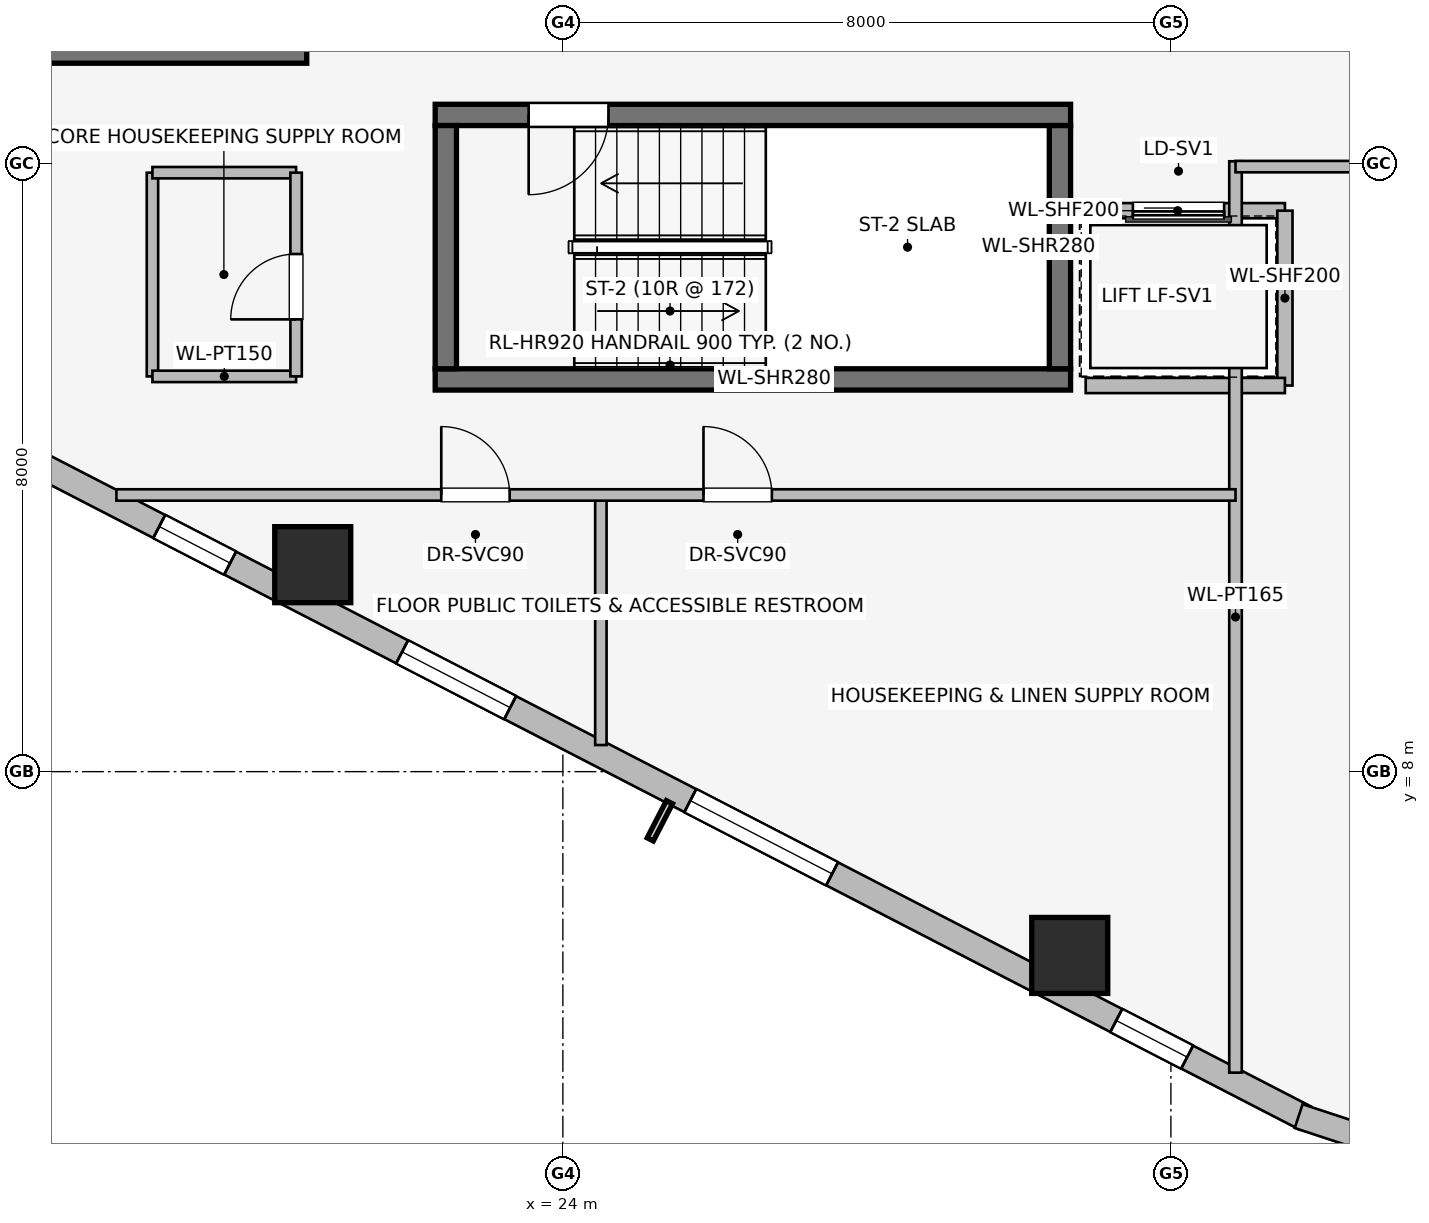
"""IFC4 building model, lengths in metres.
Left out: names, types, materials, properties, quantities, classifications, styles, units other than length and angle.
Written with IfcOpenShell. Run it as: python <this file> out.ifc"""

import sys

from ifc_helpers import new_model, si_unit, direction, frame, frame_2d, origin, origin_2d, place, context, subcontext, project, spatial, rectangle, extrude, element, fill, save


model = new_model("IFC4")
c1 = context("Model", 3, precision=1e-05, world=origin(), true_north=direction((0.0, 1.0)))
c2 = subcontext(c1, "Body", "Model", "MODEL_VIEW")
j1 = project(units=[si_unit("LENGTHUNIT", "METRE"), si_unit("PLANEANGLEUNIT", "RADIAN")], contexts=[c1])
p1 = place(None, origin())
s1 = spatial("IfcSite", under=j1, at=p1, CompositionType="ELEMENT")
p2 = place(p1, origin())
s2 = spatial("IfcBuilding", under=s1, at=p2, CompositionType="ELEMENT")
p3 = place(p2, frame((0.0, 0.0, 156.75)))
s3 = spatial("IfcBuildingStorey", under=s2, at=p3, CompositionType="ELEMENT", Elevation=156.75)
p4 = place(p3, frame((16.87, 17.46, 0.0), z_axis=(0.0, 0.0, 1.0), x_axis=(1.0, 0.0, 0.0)))
e1 = element("IfcWall", 1, at=p4, inside=s3, PredefinedType="SHEAR", context=c2, shape_type="SweptSolid", body=[
    extrude(rectangle(XDim=3.76, YDim=0.28, at=frame_2d((1.88, 0.0))), origin(), (0.0, 0.0, 1.0), 3.45),
])
p5 = place(p3, frame((22.32, 13.16, 0.0), z_axis=(0.0, 0.0, 1.0), x_axis=(1.0, 0.0, 0.0)))
e2 = element("IfcWall", 2, at=p5, inside=s3, PredefinedType="SHEAR", context=c2, shape_type="SweptSolid", body=[
    extrude(rectangle(XDim=8.36, YDim=0.28, at=frame_2d((4.18, 0.0))), origin(), (0.0, 0.0, 1.0), 3.45),
])
p6 = place(p3, frame((30.68, 16.64, 0.0), z_axis=(0.0, 0.0, 1.0), x_axis=(-1.0, 0.0, 0.0)))
e3 = element("IfcWall", 3, at=p6, inside=s3, PredefinedType="SHEAR", context=c2, shape_type="SweptSolid", body=[
    extrude(rectangle(XDim=8.36, YDim=0.28, at=frame_2d((4.18, 0.0))), origin(), (0.0, 0.0, 1.0), 3.45),
])
p7 = place(p6, frame((6.08, 0.0, 0.0)))
e4 = element("IfcOpeningElement", 4, at=p7, cuts=e3, PredefinedType="OPENING", context=c2, shape_type="SweptSolid", body=[
    extrude(rectangle(XDim=1.05, YDim=2.0, at=frame_2d((0.525, 1.0))), frame((0.0, 0.15, 0.0), z_axis=(0.0, -1.0, 0.0), x_axis=(1.0, 0.0, 0.0)), (0.0, 0.0, 1.0), 0.3),
])
for number, where, z_axis, x_axis in (
    (5, (22.46, 16.5, 0.0), (0.0, 0.0, 1.0), (0.0, -1.0, 0.0)),
    (6, (30.54, 13.3, 0.0), (0.0, 0.0, 1.0), (0.0, 1.0, 0.0)),
):
    element("IfcWall", number, at=place(p3, frame(where, z_axis=z_axis, x_axis=x_axis)), inside=s3, PredefinedType="SHEAR", context=c2, shape_type="SweptSolid", body=[
        extrude(rectangle(XDim=3.2, YDim=0.28, at=frame_2d((1.6, 0.0))), origin(), (0.0, 0.0, 1.0), 3.45),
    ])
for number, where, z_axis, x_axis in (
    (7, (20.709, 10.723, 0.0), (0.0, 0.0, 1.0), (1.0, 0.0, 0.0)),
    (8, (30.669, 5.582, 0.0), (0.0, 0.0, 1.0), (1.0, 0.0, 0.0)),
):
    element("IfcColumn", number, at=place(p3, frame(where, z_axis=z_axis, x_axis=x_axis)), inside=s3, PredefinedType="COLUMN", context=c2, shape_type="SweptSolid", body=[
        extrude(rectangle(XDim=1.0, YDim=1.0, at=origin_2d()), origin(), (0.0, 0.0, 1.0), 3.45),
    ])
p8 = place(p3, frame((17.243, 11.95, 0.0), z_axis=(0.0, 0.0, 1.0), x_axis=(-0.790621329885, 0.612305408053, 0.0)))
e9 = element("IfcWall", 9, at=p8, inside=s3, PredefinedType="STANDARD", context=c2, shape_type="SweptSolid", body=[
    extrude(rectangle(XDim=1.676, YDim=0.33, at=frame_2d((0.838, 0.0))), origin(), (0.0, 0.0, 1.0), 3.19),
])
p9 = place(p3, frame((33.769, 3.442, 0.0), z_axis=(0.0, 0.0, 1.0), x_axis=(-0.888613612362, 0.458656568606, 0.0)))
e10 = element("IfcWall", 10, at=p9, inside=s3, PredefinedType="STANDARD", context=c2, shape_type="SweptSolid", body=[
    extrude(rectangle(XDim=18.681, YDim=0.34, at=frame_2d((9.34, 0.0))), origin(), (0.0, 0.0, 1.0), 2.562),
])
p10 = place(p9, frame((1.75, 0.0, 0.75)))
e11 = element("IfcOpeningElement", 11, at=p10, cuts=e10, PredefinedType="OPENING", context=c2, shape_type="SweptSolid", body=[
    extrude(rectangle(XDim=1.05, YDim=1.4, at=frame_2d((0.525, 0.7))), frame((0.0, 0.18, 0.0), z_axis=(0.0, -1.0, 0.0), x_axis=(1.0, 0.0, 0.0)), (0.0, 0.0, 1.0), 0.36),
])
p11 = place(p9, frame((7.007, 0.0, 0.75)))
e12 = element("IfcOpeningElement", 12, at=p11, cuts=e10, PredefinedType="OPENING", context=c2, shape_type="SweptSolid", body=[
    extrude(rectangle(XDim=2.1, YDim=1.5, at=frame_2d((1.05, 0.75))), frame((0.0, 0.18, 0.0), z_axis=(0.0, -1.0, 0.0), x_axis=(1.0, 0.0, 0.0)), (0.0, 0.0, 1.0), 0.36),
])
p12 = place(p9, frame((11.774, 0.0, 0.75)))
e13 = element("IfcOpeningElement", 13, at=p12, cuts=e10, PredefinedType="OPENING", context=c2, shape_type="SweptSolid", body=[
    extrude(rectangle(XDim=1.6, YDim=1.55, at=frame_2d((0.8, 0.775))), frame((0.0, 0.18, 0.0), z_axis=(0.0, -1.0, 0.0), x_axis=(1.0, 0.0, 0.0)), (0.0, 0.0, 1.0), 0.36),
])
p13 = place(p9, frame((15.92, 0.0, 0.75)))
e14 = element("IfcOpeningElement", 14, at=p13, cuts=e10, PredefinedType="OPENING", context=c2, shape_type="SweptSolid", body=[
    extrude(rectangle(XDim=1.05, YDim=1.4, at=frame_2d((0.525, 0.7))), frame((0.0, 0.18, 0.0), z_axis=(0.0, -1.0, 0.0), x_axis=(1.0, 0.0, 0.0)), (0.0, 0.0, 1.0), 0.36),
])
p14 = place(p3, frame((35.317, 2.93, 0.0), z_axis=(0.0, 0.0, 1.0), x_axis=(-0.949937416267, 0.312440242569, 0.0)))
e15 = element("IfcWall", 15, at=p14, inside=s3, PredefinedType="STANDARD", context=c2, shape_type="SweptSolid", body=[
    extrude(rectangle(XDim=1.722, YDim=0.33, at=frame_2d((0.861, 0.0))), origin(), (0.0, 0.0, 1.0), 3.19),
])
p15 = place(p3, frame((33.5, 15.38, 0.0), z_axis=(0.0, 0.0, 1.0), x_axis=(-1.0, 0.0, 0.0)))
e16 = element("IfcWall", 16, at=p15, inside=s3, PredefinedType="PARTITIONING", context=c2, shape_type="SweptSolid", body=[
    extrude(rectangle(XDim=2.82, YDim=0.2, at=frame_2d((1.41, 0.0))), origin(), (0.0, 0.0, 1.0), 3.19),
])
p16 = place(p15, frame((0.8, 0.0, 0.0)))
e17 = element("IfcOpeningElement", 17, at=p16, cuts=e16, PredefinedType="OPENING", context=c2, shape_type="SweptSolid", body=[
    extrude(rectangle(XDim=1.2, YDim=2.2, at=frame_2d((0.6, 1.1))), frame((0.0, 0.11, 0.0), z_axis=(0.0, -1.0, 0.0), x_axis=(1.0, 0.0, 0.0)), (0.0, 0.0, 1.0), 0.22),
])
p17 = place(p3, frame((33.5, 13.08, 0.0), z_axis=(0.0, 0.0, 1.0), x_axis=(0.0, 1.0, 0.0)))
e18 = element("IfcWall", 18, at=p17, inside=s3, PredefinedType="PARTITIONING", context=c2, shape_type="SweptSolid", body=[
    extrude(rectangle(XDim=2.3, YDim=0.2, at=frame_2d((1.15, 0.0))), origin(), (0.0, 0.0, 1.0), 3.19),
])
p18 = place(p3, frame((30.879, 13.08, 0.0), z_axis=(0.0, 0.0, 1.0), x_axis=(1.0, 0.0, 0.0)))
e19 = element("IfcWall", 19, at=p18, inside=s3, PredefinedType="PARTITIONING", context=c2, shape_type="SweptSolid", body=[
    extrude(rectangle(XDim=2.621, YDim=0.2, at=frame_2d((1.311, 0.0))), origin(), (0.0, 0.0, 1.0), 3.19),
])
p19 = place(p3, frame((18.6, 15.88, 0.0), z_axis=(0.0, 0.0, 1.0), x_axis=(0.0, -1.0, 0.0)))
e20 = element("IfcWall", 20, at=p19, inside=s3, PredefinedType="PARTITIONING", context=c2, shape_type="SweptSolid", body=[
    extrude(rectangle(XDim=2.68, YDim=0.15, at=frame_2d((1.34, 0.0))), origin(), (0.0, 0.0, 1.0), 3.19),
])
for number, where, z_axis, x_axis in (
    (21, (18.6, 13.2, 0.0), (0.0, 0.0, 1.0), (1.0, 0.0, 0.0)),
    (22, (18.6, 15.88, 0.0), (0.0, 0.0, 1.0), (1.0, 0.0, 0.0)),
):
    element("IfcWall", number, at=place(p3, frame(where, z_axis=z_axis, x_axis=x_axis)), inside=s3, PredefinedType="PARTITIONING", context=c2, shape_type="SweptSolid", body=[
        extrude(rectangle(XDim=1.89, YDim=0.15, at=frame_2d((0.945, 0.0))), origin(), (0.0, 0.0, 1.0), 3.19),
    ])
p20 = place(p3, frame((20.49, 13.2, 0.0), z_axis=(0.0, 0.0, 1.0), x_axis=(0.0, 1.0, 0.0)))
e23 = element("IfcWall", 23, at=p20, inside=s3, PredefinedType="PARTITIONING", context=c2, shape_type="SweptSolid", body=[
    extrude(rectangle(XDim=2.68, YDim=0.15, at=frame_2d((1.34, 0.0))), origin(), (0.0, 0.0, 1.0), 3.19),
])
p21 = place(p20, frame((0.75, 0.0, 0.0)))
e24 = element("IfcOpeningElement", 24, at=p21, cuts=e23, PredefinedType="OPENING", context=c2, shape_type="SweptSolid", body=[
    extrude(rectangle(XDim=0.86, YDim=2.0, at=frame_2d((0.43, 1.0))), frame((0.0, 0.085, 0.0), z_axis=(0.0, -1.0, 0.0), x_axis=(1.0, 0.0, 0.0)), (0.0, 0.0, 1.0), 0.17),
])
p22 = place(p3, frame((32.85, 4.04, 0.0), z_axis=(0.0, 0.0, 1.0), x_axis=(0.0, 1.0, 0.0)))
e25 = element("IfcWall", 25, at=p22, inside=s3, PredefinedType="PARTITIONING", context=c2, shape_type="SweptSolid", body=[
    extrude(rectangle(XDim=11.99, YDim=0.165, at=frame_2d((5.995, 0.0))), origin(), (0.0, 0.0, 1.0), 3.19),
])
p23 = place(p3, frame((24.5, 8.35, 0.0), z_axis=(0.0, 0.0, 1.0), x_axis=(0.0, 1.0, 0.0)))
e26 = element("IfcWall", 26, at=p23, inside=s3, PredefinedType="PARTITIONING", context=c2, shape_type="SweptSolid", body=[
    extrude(rectangle(XDim=3.29, YDim=0.15, at=frame_2d((1.645, 0.0))), origin(), (0.0, 0.0, 1.0), 3.19),
])
p24 = place(p3, frame((18.126, 11.64, 0.0), z_axis=(0.0, 0.0, 1.0), x_axis=(1.0, 0.0, 0.0)))
e27 = element("IfcWall", 27, at=p24, inside=s3, PredefinedType="PARTITIONING", context=c2, shape_type="SweptSolid", body=[
    extrude(rectangle(XDim=14.724, YDim=0.15, at=frame_2d((7.362, 0.0))), origin(), (0.0, 0.0, 1.0), 3.19),
])
p25 = place(p24, frame((4.274, 0.0, 0.0)))
e28 = element("IfcOpeningElement", 28, at=p25, cuts=e27, PredefinedType="OPENING", context=c2, shape_type="SweptSolid", body=[
    extrude(rectangle(XDim=0.9, YDim=2.0, at=frame_2d((0.45, 1.0))), frame((0.0, 0.085, 0.0), z_axis=(0.0, -1.0, 0.0), x_axis=(1.0, 0.0, 0.0)), (0.0, 0.0, 1.0), 0.17),
])
p26 = place(p24, frame((7.724, 0.0, 0.0)))
e29 = element("IfcOpeningElement", 29, at=p26, cuts=e27, PredefinedType="OPENING", context=c2, shape_type="SweptSolid", body=[
    extrude(rectangle(XDim=0.9, YDim=2.0, at=frame_2d((0.45, 1.0))), frame((0.0, 0.085, 0.0), z_axis=(0.0, -1.0, 0.0), x_axis=(1.0, 0.0, 0.0)), (0.0, 0.0, 1.0), 0.17),
])
p27 = place(p3, frame((32.85, 15.96, 0.0), z_axis=(0.0, 0.0, 1.0), x_axis=(1.0, 0.0, 0.0)))
e30 = element("IfcWall", 30, at=p27, inside=s3, PredefinedType="PARTITIONING", context=c2, shape_type="SweptSolid", body=[
    extrude(rectangle(XDim=11.571, YDim=0.15, at=frame_2d((5.785, 0.0))), origin(), (0.0, 0.0, 1.0), 3.19),
])
p28 = place(p27, frame((5.306, 0.0, 0.0)))
e31 = element("IfcOpeningElement", 31, at=p28, cuts=e30, PredefinedType="OPENING", context=c2, shape_type="SweptSolid", body=[
    extrude(rectangle(XDim=0.96, YDim=2.0, at=frame_2d((0.48, 1.0))), frame((0.0, 0.085, 0.0), z_axis=(0.0, -1.0, 0.0), x_axis=(1.0, 0.0, 0.0)), (0.0, 0.0, 1.0), 0.17),
])
p29 = place(p10, origin())
e32 = element("IfcWindow", 32, at=p29, inside=s3, PartitioningType="SINGLE_PANEL", PredefinedType="WINDOW", context=c2, shape_type="SweptSolid", body=[
    extrude(rectangle(XDim=1.05, YDim=1.4, at=frame_2d((0.525, 0.7))), frame((0.0, 0.03, 0.0), z_axis=(0.0, -1.0, 0.0), x_axis=(1.0, 0.0, 0.0)), (0.0, 0.0, 1.0), 0.06),
])
fill(e11, e32)
p30 = place(p11, origin())
e33 = element("IfcWindow", 33, at=p30, inside=s3, PartitioningType="SINGLE_PANEL", PredefinedType="WINDOW", context=c2, shape_type="SweptSolid", body=[
    extrude(rectangle(XDim=2.1, YDim=1.5, at=frame_2d((1.05, 0.75))), frame((0.0, 0.03, 0.0), z_axis=(0.0, -1.0, 0.0), x_axis=(1.0, 0.0, 0.0)), (0.0, 0.0, 1.0), 0.06),
])
fill(e12, e33)
p31 = place(p12, origin())
e34 = element("IfcWindow", 34, at=p31, inside=s3, PartitioningType="SINGLE_PANEL", PredefinedType="WINDOW", context=c2, shape_type="SweptSolid", body=[
    extrude(rectangle(XDim=1.6, YDim=1.55, at=frame_2d((0.8, 0.775))), frame((0.0, 0.03, 0.0), z_axis=(0.0, -1.0, 0.0), x_axis=(1.0, 0.0, 0.0)), (0.0, 0.0, 1.0), 0.06),
])
fill(e13, e34)
p32 = place(p13, origin())
e35 = element("IfcWindow", 35, at=p32, inside=s3, PartitioningType="SINGLE_PANEL", PredefinedType="WINDOW", context=c2, shape_type="SweptSolid", body=[
    extrude(rectangle(XDim=1.05, YDim=1.4, at=frame_2d((0.525, 0.7))), frame((0.0, 0.03, 0.0), z_axis=(0.0, -1.0, 0.0), x_axis=(1.0, 0.0, 0.0)), (0.0, 0.0, 1.0), 0.06),
])
fill(e14, e35)
p33 = place(p7, origin())
e36 = element("IfcDoor", 36, at=p33, inside=s3, OperationType="SINGLE_SWING_RIGHT", PredefinedType="DOOR", context=c2, shape_type="SweptSolid", body=[
    extrude(rectangle(XDim=1.05, YDim=2.0, at=frame_2d((0.525, 1.0))), frame((0.0, 0.025, 0.0), z_axis=(0.0, -1.0, 0.0), x_axis=(1.0, 0.0, 0.0)), (0.0, 0.0, 1.0), 0.05),
])
fill(e4, e36)
p34 = place(p16, origin())
e37 = element("IfcDoor", 37, at=p34, inside=s3, OperationType="SLIDING_TO_RIGHT", PredefinedType="DOOR", context=c2, shape_type="SweptSolid", body=[
    extrude(rectangle(XDim=1.2, YDim=2.2, at=frame_2d((0.6, 1.1))), frame((0.0, 0.025, 0.0), z_axis=(0.0, -1.0, 0.0), x_axis=(1.0, 0.0, 0.0)), (0.0, 0.0, 1.0), 0.05),
])
fill(e17, e37)
p35 = place(p21, origin())
e38 = element("IfcDoor", 38, at=p35, inside=s3, OperationType="SINGLE_SWING_LEFT", PredefinedType="DOOR", context=c2, shape_type="SweptSolid", body=[
    extrude(rectangle(XDim=0.86, YDim=2.0, at=frame_2d((0.43, 1.0))), frame((0.0, 0.025, 0.0), z_axis=(0.0, -1.0, 0.0), x_axis=(1.0, 0.0, 0.0)), (0.0, 0.0, 1.0), 0.05),
])
fill(e24, e38)
p36 = place(p25, origin())
e39 = element("IfcDoor", 39, at=p36, inside=s3, OperationType="SINGLE_SWING_LEFT", PredefinedType="DOOR", context=c2, shape_type="SweptSolid", body=[
    extrude(rectangle(XDim=0.9, YDim=2.0, at=frame_2d((0.45, 1.0))), frame((0.0, 0.025, 0.0), z_axis=(0.0, -1.0, 0.0), x_axis=(1.0, 0.0, 0.0)), (0.0, 0.0, 1.0), 0.05),
])
fill(e28, e39)
p37 = place(p26, origin())
e40 = element("IfcDoor", 40, at=p37, inside=s3, OperationType="SINGLE_SWING_LEFT", PredefinedType="DOOR", context=c2, shape_type="SweptSolid", body=[
    extrude(rectangle(XDim=0.9, YDim=2.0, at=frame_2d((0.45, 1.0))), frame((0.0, 0.025, 0.0), z_axis=(0.0, -1.0, 0.0), x_axis=(1.0, 0.0, 0.0)), (0.0, 0.0, 1.0), 0.05),
])
fill(e29, e40)
save(model, sys.argv[1])
